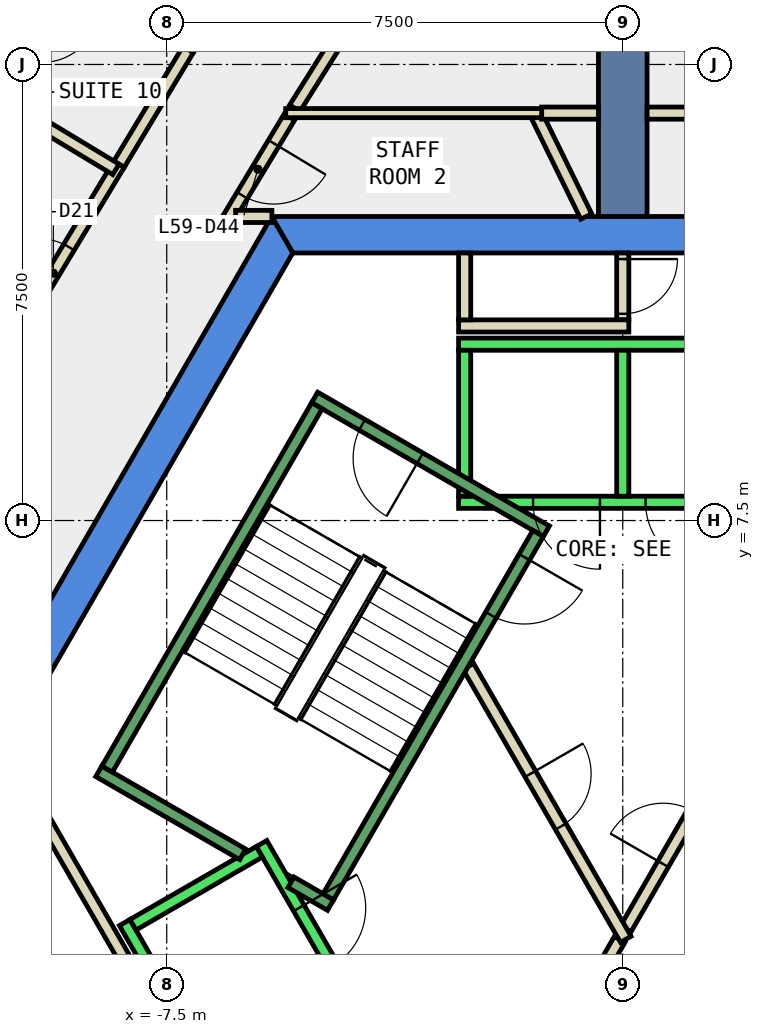
"""IFC4 building model, lengths in metres.
Left out: names, types, materials, properties, quantities, classifications, styles, units other than length and angle.
Written with IfcOpenShell. Run it as: python <this file> out.ifc"""

import sys

from ifc_helpers import new_model, si_unit, direction, frame, frame_2d, origin, place, context, subcontext, project, spatial, polyline, rectangle, outline, extrude, element, fill, save


model = new_model("IFC4")
c1 = context("Model", 3, precision=1e-05, world=origin(), true_north=direction((0.0, 1.0)))
c2 = subcontext(c1, "Body", "Model", "MODEL_VIEW")
j1 = project(units=[si_unit("LENGTHUNIT", "METRE"), si_unit("PLANEANGLEUNIT", "RADIAN")], contexts=[c1])
p1 = place(None, origin())
s1 = spatial("IfcSite", under=j1, at=p1, CompositionType="ELEMENT")
p2 = place(p1, origin())
s2 = spatial("IfcBuilding", under=s1, at=p2, CompositionType="ELEMENT")
p3 = place(p2, frame((0.0, 0.0, 259.4)))
s3 = spatial("IfcBuildingStorey", under=s2, at=p3, CompositionType="ELEMENT", Elevation=259.4)
p4 = place(p3, frame((0.0, 0.0, -0.34)))
e1 = element("IfcWall", 1, at=p4, inside=s3, PredefinedType="SHEAR", context=c2, shape_type="SweptSolid", body=[
    extrude(outline(polyline([(5.774, 12.5), (-5.774, 12.5), (-5.427, 11.9), (5.427, 11.9), (5.774, 12.5)])), origin(), (0.0, 0.0, 1.0), 3.6),
])
p5 = place(p3, frame((0.0, 0.0, -0.34)))
e2 = element("IfcWall", 2, at=p5, inside=s3, PredefinedType="SHEAR", context=c2, shape_type="SweptSolid", body=[
    extrude(outline(polyline([(-10.535, 4.253), (-10.015, 3.953), (-5.427, 11.9), (-5.774, 12.5), (-10.535, 4.253)])), origin(), (0.0, 0.0, 1.0), 3.6),
])
p6 = place(p3, frame((0.0, 0.0, -0.34)))
e3 = element("IfcWall", 3, at=p6, inside=s3, PredefinedType="SHEAR", context=c2, shape_type="SweptSolid", body=[
    extrude(outline(polyline([(-11.547, 2.5), (-5.774, -7.5), (-5.427, -6.9), (-10.854, 2.5), (-11.547, 2.5)])), origin(), (0.0, 0.0, 1.0), 3.6),
])
p7 = place(p3, frame((0.0, 12.5, -0.34), z_axis=(0.0, 0.0, 1.0), x_axis=(0.0, 1.0, 0.0)))
e4 = element("IfcWall", 4, at=p7, inside=s3, PredefinedType="SHEAR", context=c2, shape_type="SweptSolid", body=[
    extrude(rectangle(XDim=9.0, YDim=0.8, at=frame_2d((4.5, 0.0))), origin(), (0.0, 0.0, 1.0), 3.6),
])
p8 = place(p3, frame((-0.6, 12.5, 0.0), z_axis=(0.0, 0.0, 1.0), x_axis=(-0.440531456598, 0.897737175206, 0.0)))
e5 = element("IfcWall", 5, at=p8, inside=s3, PredefinedType="PARTITIONING", context=c2, shape_type="SweptSolid", body=[
    extrude(rectangle(XDim=1.918, YDim=0.2, at=frame_2d((0.959, 0.0))), origin(), (0.0, 0.0, 1.0), 3.26),
])
p9 = place(p3, frame((-5.482, 14.136, 0.0), z_axis=(0.0, 0.0, 1.0), x_axis=(-0.516156559549, -0.856494253357, 0.0)))
e6 = element("IfcWall", 6, at=p9, inside=s3, PredefinedType="PARTITIONING", context=c2, shape_type="SweptSolid", body=[
    extrude(rectangle(XDim=2.009, YDim=0.2, at=frame_2d((1.005, 0.0))), origin(), (0.0, 0.0, 1.0), 3.26),
])
p10 = place(p9, frame((0.504, 0.0, 0.0)))
e7 = element("IfcOpeningElement", 7, at=p10, cuts=e6, PredefinedType="OPENING", context=c2, shape_type="SweptSolid", body=[
    extrude(rectangle(XDim=1.0, YDim=2.1, at=frame_2d((0.5, 1.05))), frame((0.0, 0.11, 0.0), z_axis=(0.0, -1.0, 0.0), x_axis=(1.0, 0.0, 0.0)), (0.0, 0.0, 1.0), 0.22),
])
p11 = place(p3, frame((-6.367, 12.501, 0.0), z_axis=(0.0, 0.0, 1.0), x_axis=(1.0, 0.0, 0.0)))
e8 = element("IfcWall", 8, at=p11, inside=s3, PredefinedType="PARTITIONING", context=c2, shape_type="SweptSolid", body=[
    extrude(rectangle(XDim=0.596, YDim=0.2, at=frame_2d((0.298, 0.0))), origin(), (0.0, 0.0, 1.0), 3.26),
])
p12 = place(p3, frame((0.4, 14.2, 0.0), z_axis=(0.0, 0.0, 1.0), x_axis=(1.0, 0.0, 0.0)))
e9 = element("IfcWall", 9, at=p12, inside=s3, PredefinedType="PARTITIONING", context=c2, shape_type="SweptSolid", body=[
    extrude(rectangle(XDim=5.143, YDim=0.2, at=frame_2d((2.572, 0.0))), origin(), (0.0, 0.0, 1.0), 3.26),
])
p13 = place(p3, frame((-1.334, 14.2, 0.0), z_axis=(0.0, 0.0, 1.0), x_axis=(1.0, 0.0, 0.0)))
e10 = element("IfcWall", 10, at=p13, inside=s3, PredefinedType="PARTITIONING", context=c2, shape_type="SweptSolid", body=[
    extrude(rectangle(XDim=0.934, YDim=0.2, at=frame_2d((0.467, 0.0))), origin(), (0.0, 0.0, 1.0), 3.26),
])
p14 = place(p3, frame((-2.311, 19.181, 0.0), z_axis=(0.0, 0.0, 1.0), x_axis=(-0.532551510955, -0.846397594621, 0.0)))
e11 = element("IfcWall", 11, at=p14, inside=s3, PredefinedType="PARTITIONING", context=c2, shape_type="SweptSolid", body=[
    extrude(rectangle(XDim=5.789, YDim=0.2, at=frame_2d((2.895, 0.0))), origin(), (0.0, 0.0, 1.0), 3.26),
])
p15 = place(p14, frame((2.394, 0.0, 0.0)))
e12 = element("IfcOpeningElement", 12, at=p15, cuts=e11, PredefinedType="OPENING", context=c2, shape_type="SweptSolid", body=[
    extrude(rectangle(XDim=1.0, YDim=2.1, at=frame_2d((0.5, 1.05))), frame((0.0, 0.11, 0.0), z_axis=(0.0, -1.0, 0.0), x_axis=(1.0, 0.0, 0.0)), (0.0, 0.0, 1.0), 0.22),
])
p16 = place(p3, frame((-7.15, 15.246, 0.0), z_axis=(0.0, 0.0, 1.0), x_axis=(0.532449518014, 0.846461759778, 0.0)))
e13 = element("IfcWall", 13, at=p16, inside=s3, PredefinedType="PARTITIONING", context=c2, shape_type="SweptSolid", body=[
    extrude(rectangle(XDim=3.525, YDim=0.2, at=frame_2d((1.763, 0.0))), origin(), (0.0, 0.0, 1.0), 3.26),
])
p17 = place(p16, frame((1.313, 0.0, 0.0)))
e14 = element("IfcOpeningElement", 14, at=p17, cuts=e13, PredefinedType="OPENING", context=c2, shape_type="SweptSolid", body=[
    extrude(rectangle(XDim=1.0, YDim=2.1, at=frame_2d((0.5, 1.05))), frame((0.0, 0.11, 0.0), z_axis=(0.0, -1.0, 0.0), x_axis=(1.0, 0.0, 0.0)), (0.0, 0.0, 1.0), 0.22),
])
p18 = place(p3, frame((-10.498, 9.689, 0.0), z_axis=(0.0, 0.0, 1.0), x_axis=(0.516353342298, 0.856375633643, 0.0)))
e15 = element("IfcWall", 15, at=p18, inside=s3, PredefinedType="PARTITIONING", context=c2, shape_type="SweptSolid", body=[
    extrude(rectangle(XDim=4.288, YDim=0.2, at=frame_2d((2.144, 0.0))), origin(), (0.0, 0.0, 1.0), 3.26),
])
p19 = place(p18, frame((1.694, 0.0, 0.0)))
e16 = element("IfcOpeningElement", 16, at=p19, cuts=e15, PredefinedType="OPENING", context=c2, shape_type="SweptSolid", body=[
    extrude(rectangle(XDim=1.0, YDim=2.1, at=frame_2d((0.5, 1.05))), frame((0.0, 0.11, 0.0), z_axis=(0.0, -1.0, 0.0), x_axis=(1.0, 0.0, 0.0)), (0.0, 0.0, 1.0), 0.22),
])
p20 = place(p3, frame((-8.284, 13.361, 0.0), z_axis=(0.0, 0.0, 1.0), x_axis=(0.516354965559, 0.856374654893, 0.0)))
e17 = element("IfcWall", 17, at=p20, inside=s3, PredefinedType="PARTITIONING", context=c2, shape_type="SweptSolid", body=[
    extrude(rectangle(XDim=2.2, YDim=0.2, at=frame_2d((1.1, 0.0))), origin(), (0.0, 0.0, 1.0), 3.26),
])
p21 = place(p3, frame((0.0, 11.9, 0.0), z_axis=(0.0, 0.0, 1.0), x_axis=(0.0, -1.0, 0.0)))
e18 = element("IfcWall", 18, at=p21, inside=s3, PredefinedType="PARTITIONING", context=c2, shape_type="SweptSolid", body=[
    extrude(rectangle(XDim=1.1, YDim=0.2, at=frame_2d((0.55, 0.0))), origin(), (0.0, 0.0, 1.0), 3.26),
])
p22 = place(p21, frame((0.1, 0.0, 0.0)))
e19 = element("IfcOpeningElement", 19, at=p22, cuts=e18, PredefinedType="OPENING", context=c2, shape_type="SweptSolid", body=[
    extrude(rectangle(XDim=0.9, YDim=2.1, at=frame_2d((0.45, 1.05))), frame((0.0, 0.11, 0.0), z_axis=(0.0, -1.0, 0.0), x_axis=(1.0, 0.0, 0.0)), (0.0, 0.0, 1.0), 0.22),
])
p23 = place(p3, frame((0.1, 10.7, 0.0), z_axis=(0.0, 0.0, 1.0), x_axis=(-1.0, 0.0, 0.0)))
e20 = element("IfcWall", 20, at=p23, inside=s3, PredefinedType="PARTITIONING", context=c2, shape_type="SweptSolid", body=[
    extrude(rectangle(XDim=2.8, YDim=0.2, at=frame_2d((1.4, 0.0))), origin(), (0.0, 0.0, 1.0), 3.26),
])
p24 = place(p3, frame((-2.6, 10.8, 0.0), z_axis=(0.0, 0.0, 1.0), x_axis=(0.0, 1.0, 0.0)))
e21 = element("IfcWall", 21, at=p24, inside=s3, PredefinedType="PARTITIONING", context=c2, shape_type="SweptSolid", body=[
    extrude(rectangle(XDim=1.1, YDim=0.2, at=frame_2d((0.55, 0.0))), origin(), (0.0, 0.0, 1.0), 3.26),
])
p25 = place(p3, frame((-9.751, 2.99, 0.0), z_axis=(0.0, 0.0, 1.0), x_axis=(0.499955951776, -0.866050833545, 0.0)))
e22 = element("IfcWall", 22, at=p25, inside=s3, PredefinedType="PARTITIONING", context=c2, shape_type="SweptSolid", body=[
    extrude(rectangle(XDim=5.4, YDim=0.2, at=frame_2d((2.7, 0.0))), origin(), (0.0, 0.0, 1.0), 3.26),
])
p26 = place(p3, frame((-1.334, 14.2, 0.0), z_axis=(0.0, 0.0, 1.0), x_axis=(-1.0, 0.0, 0.0)))
e23 = element("IfcWall", 23, at=p26, inside=s3, PredefinedType="PARTITIONING", context=c2, shape_type="SweptSolid", body=[
    extrude(rectangle(XDim=4.209, YDim=0.15, at=frame_2d((2.104, 0.0))), origin(), (0.0, 0.0, 1.0), 3.26),
])
p27 = place(p3, frame((-0.982, -1.0, 0.0), z_axis=(0.0, 0.0, 1.0), x_axis=(0.50024047865, 0.865886518847, 0.0)))
e24 = element("IfcWall", 24, at=p27, inside=s3, PredefinedType="PARTITIONING", context=c2, shape_type="SweptSolid", body=[
    extrude(rectangle(XDim=1.863, YDim=0.2, at=frame_2d((0.931, 0.0))), origin(), (0.0, 0.0, 1.0), 3.26),
])
p28 = place(p3, frame((0.05, 0.787, 0.0), z_axis=(0.0, 0.0, 1.0), x_axis=(0.499954076797, 0.866051915934, 0.0)))
e25 = element("IfcWall", 25, at=p28, inside=s3, PredefinedType="PARTITIONING", context=c2, shape_type="SweptSolid", body=[
    extrude(rectangle(XDim=3.558, YDim=0.2, at=frame_2d((1.779, 0.0))), origin(), (0.0, 0.0, 1.0), 3.26),
])
p29 = place(p28, frame((1.229, 0.0, 0.0)))
e26 = element("IfcOpeningElement", 26, at=p29, cuts=e25, PredefinedType="OPENING", context=c2, shape_type="SweptSolid", body=[
    extrude(rectangle(XDim=1.0, YDim=2.1, at=frame_2d((0.5, 1.05))), frame((0.0, 0.11, 0.0), z_axis=(0.0, -1.0, 0.0), x_axis=(1.0, 0.0, 0.0)), (0.0, 0.0, 1.0), 0.22),
])
p30 = place(p3, frame((-2.54, 5.1, 0.0), z_axis=(0.0, 0.0, 1.0), x_axis=(0.499925051871, -0.866068670783, 0.0)))
e27 = element("IfcWall", 27, at=p30, inside=s3, PredefinedType="PARTITIONING", context=c2, shape_type="SweptSolid", body=[
    extrude(rectangle(XDim=5.181, YDim=0.2, at=frame_2d((2.59, 0.0))), origin(), (0.0, 0.0, 1.0), 3.26),
])
p31 = place(p30, frame((2.04, 0.0, 0.0)))
e28 = element("IfcOpeningElement", 28, at=p31, cuts=e27, PredefinedType="OPENING", context=c2, shape_type="SweptSolid", body=[
    extrude(rectangle(XDim=1.0, YDim=2.1, at=frame_2d((0.5, 1.05))), frame((0.0, 0.11, 0.0), z_axis=(0.0, -1.0, 0.0), x_axis=(1.0, 0.0, 0.0)), (0.0, 0.0, 1.0), 0.22),
])
p32 = place(p3, frame((-9.088, 16.674, 0.0), z_axis=(0.0, 0.0, 1.0), x_axis=(-0.516780274192, -0.856118069081, 0.0)))
e29 = element("IfcWall", 29, at=p32, inside=s3, PredefinedType="PARTITIONING", context=c2, shape_type="SweptSolid", body=[
    extrude(rectangle(XDim=2.623, YDim=0.2, at=frame_2d((1.311, 0.0))), origin(), (0.0, 0.0, 1.0), 3.26),
])
p33 = place(p32, frame((0.861, 0.0, 0.0)))
e30 = element("IfcOpeningElement", 30, at=p33, cuts=e29, PredefinedType="OPENING", context=c2, shape_type="SweptSolid", body=[
    extrude(rectangle(XDim=0.9, YDim=2.1, at=frame_2d((0.45, 1.05))), frame((0.0, 0.11, 0.0), z_axis=(0.0, -1.0, 0.0), x_axis=(1.0, 0.0, 0.0)), (0.0, 0.0, 1.0), 0.22),
])
p34 = place(p3, frame((-10.306, 14.463, 0.0), z_axis=(0.0, 0.0, 1.0), x_axis=(0.856338986581, -0.51641411683, 0.0)))
e31 = element("IfcWall", 31, at=p34, inside=s3, PredefinedType="PARTITIONING", context=c2, shape_type="SweptSolid", body=[
    extrude(rectangle(XDim=2.301, YDim=0.2, at=frame_2d((1.15, 0.0))), origin(), (0.0, 0.0, 1.0), 3.26),
])
p35 = place(p3, frame((-9.25, -4.879, 0.0), z_axis=(0.0, 0.0, 1.0), x_axis=(-0.499944124422, 0.866057661161, 0.0)))
e32 = element("IfcWall", 32, at=p35, inside=s3, PredefinedType="PARTITIONING", context=c2, shape_type="SweptSolid", body=[
    extrude(rectangle(XDim=7.405, YDim=0.2, at=frame_2d((3.702, 0.0))), origin(), (0.0, 0.0, 1.0), 3.26),
])
p36 = place(p35, frame((2.533, 0.0, 0.0)))
e33 = element("IfcOpeningElement", 33, at=p36, cuts=e32, PredefinedType="OPENING", context=c2, shape_type="SweptSolid", body=[
    extrude(rectangle(XDim=0.9, YDim=2.1, at=frame_2d((0.45, 1.05))), frame((0.0, 0.11, 0.0), z_axis=(0.0, -1.0, 0.0), x_axis=(1.0, 0.0, 0.0)), (0.0, 0.0, 1.0), 0.22),
])
p37 = place(p3, frame((2.7, 7.8, 0.0), z_axis=(0.0, 0.0, 1.0), x_axis=(-1.0, 0.0, 0.0)))
e34 = element("IfcWall", 34, at=p37, inside=s3, PredefinedType="STANDARD", context=c2, shape_type="SweptSolid", body=[
    extrude(rectangle(XDim=5.4, YDim=0.2, at=frame_2d((2.7, 0.0))), origin(), (0.0, 0.0, 1.0), 3.26),
])
p38 = place(p37, frame((1.225, 0.0, 0.0)))
e35 = element("IfcOpeningElement", 35, at=p38, cuts=e34, PredefinedType="OPENING", context=c2, shape_type="SweptSolid", body=[
    extrude(rectangle(XDim=1.1, YDim=2.1, at=frame_2d((0.55, 1.05))), frame((0.0, 0.11, 0.0), z_axis=(0.0, -1.0, 0.0), x_axis=(1.0, 0.0, 0.0)), (0.0, 0.0, 1.0), 0.22),
])
p39 = place(p37, frame((3.075, 0.0, 0.0)))
e36 = element("IfcOpeningElement", 36, at=p39, cuts=e34, PredefinedType="OPENING", context=c2, shape_type="SweptSolid", body=[
    extrude(rectangle(XDim=1.1, YDim=2.1, at=frame_2d((0.55, 1.05))), frame((0.0, 0.11, 0.0), z_axis=(0.0, -1.0, 0.0), x_axis=(1.0, 0.0, 0.0)), (0.0, 0.0, 1.0), 0.22),
])
p40 = place(p3, frame((2.7, 10.4, 0.0), z_axis=(0.0, 0.0, 1.0), x_axis=(-1.0, 0.0, 0.0)))
e37 = element("IfcWall", 37, at=p40, inside=s3, PredefinedType="STANDARD", context=c2, shape_type="SweptSolid", body=[
    extrude(rectangle(XDim=5.4, YDim=0.2, at=frame_2d((2.7, 0.0))), origin(), (0.0, 0.0, 1.0), 3.26),
])
for number, where, z_axis, x_axis in (
    (38, (0.0, 7.9, 0.0), (0.0, 0.0, 1.0), (0.0, 1.0, 0.0)),
    (39, (-2.6, 7.9, 0.0), (0.0, 0.0, 1.0), (0.0, 1.0, 0.0)),
):
    element("IfcWall", number, at=place(p3, frame(where, z_axis=z_axis, x_axis=x_axis)), inside=s3, PredefinedType="STANDARD", context=c2, shape_type="SweptSolid", body=[
        extrude(rectangle(XDim=2.4, YDim=0.2, at=frame_2d((1.2, 0.0))), origin(), (0.0, 0.0, 1.0), 3.26),
    ])
p41 = place(p3, frame((-5.94, 2.188, 0.0), z_axis=(0.0, 0.0, 1.0), x_axis=(0.500034260056, -0.866005622828, 0.0)))
e40 = element("IfcWall", 40, at=p41, inside=s3, PredefinedType="STANDARD", context=c2, shape_type="SweptSolid", body=[
    extrude(rectangle(XDim=5.399, YDim=0.2, at=frame_2d((2.7, 0.0))), origin(), (0.0, 0.0, 1.0), 3.26),
])
p42 = place(p41, frame((3.075, 0.0, 0.0)))
e41 = element("IfcOpeningElement", 41, at=p42, cuts=e40, PredefinedType="OPENING", context=c2, shape_type="SweptSolid", body=[
    extrude(rectangle(XDim=1.1, YDim=2.1, at=frame_2d((0.55, 1.05))), frame((0.0, 0.11, 0.0), z_axis=(0.0, -1.0, 0.0), x_axis=(1.0, 0.0, 0.0)), (0.0, 0.0, 1.0), 0.22),
])
p43 = place(p41, frame((1.225, 0.0, 0.0)))
e42 = element("IfcOpeningElement", 42, at=p43, cuts=e40, PredefinedType="OPENING", context=c2, shape_type="SweptSolid", body=[
    extrude(rectangle(XDim=1.1, YDim=2.1, at=frame_2d((0.55, 1.05))), frame((0.0, 0.11, 0.0), z_axis=(0.0, -1.0, 0.0), x_axis=(1.0, 0.0, 0.0)), (0.0, 0.0, 1.0), 0.22),
])
p44 = place(p3, frame((-8.192, 0.888, 0.0), z_axis=(0.0, 0.0, 1.0), x_axis=(0.500034260056, -0.866005622828, 0.0)))
e43 = element("IfcWall", 43, at=p44, inside=s3, PredefinedType="STANDARD", context=c2, shape_type="SweptSolid", body=[
    extrude(rectangle(XDim=5.399, YDim=0.2, at=frame_2d((2.7, 0.0))), origin(), (0.0, 0.0, 1.0), 3.26),
])
p45 = place(p3, frame((-5.977, 2.052, 0.0), z_axis=(0.0, 0.0, 1.0), x_axis=(-0.865973769406, -0.500089422704, 0.0)))
e44 = element("IfcWall", 44, at=p45, inside=s3, PredefinedType="STANDARD", context=c2, shape_type="SweptSolid", body=[
    extrude(rectangle(XDim=2.399, YDim=0.2, at=frame_2d((1.2, 0.0))), origin(), (0.0, 0.0, 1.0), 3.26),
])
p46 = place(p3, frame((-1.256, 7.324, 0.0), z_axis=(0.0, 0.0, 1.0), x_axis=(-0.866046073146, 0.499964197906, 0.0)))
e45 = element("IfcWall", 45, at=p46, inside=s3, PredefinedType="STANDARD", context=c2, shape_type="SweptSolid", body=[
    extrude(rectangle(XDim=4.4, YDim=0.2, at=frame_2d((2.2, 0.0))), origin(), (0.0, 0.0, 1.0), 3.26),
])
p47 = place(p46, frame((2.4, 0.0, 0.0)))
e46 = element("IfcOpeningElement", 46, at=p47, cuts=e45, PredefinedType="OPENING", context=c2, shape_type="SweptSolid", body=[
    extrude(rectangle(XDim=1.1, YDim=2.2, at=frame_2d((0.55, 1.1))), frame((0.0, 0.11, 0.0), z_axis=(0.0, -1.0, 0.0), x_axis=(1.0, 0.0, 0.0)), (0.0, 0.0, 1.0), 0.22),
])
p48 = place(p3, frame((-6.25, 2.01, 0.0), z_axis=(0.0, 0.0, 1.0), x_axis=(-0.86611865017, 0.499838457731, 0.0)))
e47 = element("IfcWall", 47, at=p48, inside=s3, PredefinedType="STANDARD", context=c2, shape_type="SweptSolid", body=[
    extrude(rectangle(XDim=2.733, YDim=0.2, at=frame_2d((1.366, 0.0))), origin(), (0.0, 0.0, 1.0), 3.26),
])
p49 = place(p3, frame((-4.806, 1.176, 0.0), z_axis=(0.0, 0.0, 1.0), x_axis=(-0.866558586415, 0.499075361355, 0.0)))
e48 = element("IfcWall", 48, at=p49, inside=s3, PredefinedType="STANDARD", context=c2, shape_type="SweptSolid", body=[
    extrude(rectangle(XDim=0.751, YDim=0.2, at=frame_2d((0.376, 0.0))), origin(), (0.0, 0.0, 1.0), 3.26),
])
p50 = place(p3, frame((-1.393, 7.288, 0.0), z_axis=(0.0, 0.0, 1.0), x_axis=(-0.499963383562, -0.866046543262, 0.0)))
e49 = element("IfcWall", 49, at=p50, inside=s3, PredefinedType="STANDARD", context=c2, shape_type="SweptSolid", body=[
    extrude(rectangle(XDim=6.9, YDim=0.2, at=frame_2d((3.45, 0.0))), origin(), (0.0, 0.0, 1.0), 3.26),
])
p51 = place(p50, frame((0.45, 0.0, 0.0)))
e50 = element("IfcOpeningElement", 50, at=p51, cuts=e49, PredefinedType="OPENING", context=c2, shape_type="SweptSolid", body=[
    extrude(rectangle(XDim=1.1, YDim=2.2, at=frame_2d((0.55, 1.1))), frame((0.0, 0.11, 0.0), z_axis=(0.0, -1.0, 0.0), x_axis=(1.0, 0.0, 0.0)), (0.0, 0.0, 1.0), 0.22),
])
p52 = place(p3, frame((-5.03, 9.388, 0.0), z_axis=(0.0, 0.0, 1.0), x_axis=(-0.499978703459, -0.866037698999, 0.0)))
e51 = element("IfcWall", 51, at=p52, inside=s3, PredefinedType="STANDARD", context=c2, shape_type="SweptSolid", body=[
    extrude(rectangle(XDim=6.9, YDim=0.2, at=frame_2d((3.45, 0.0))), origin(), (0.0, 0.0, 1.0), 3.26),
])
p53 = place(p19, origin())
e52 = element("IfcDoor", 52, at=p53, inside=s3, OperationType="SINGLE_SWING_RIGHT", PredefinedType="DOOR", context=c2, shape_type="SweptSolid", body=[
    extrude(rectangle(XDim=1.0, YDim=2.1, at=frame_2d((0.5, 1.05))), frame((0.0, 0.025, 0.0), z_axis=(0.0, -1.0, 0.0), x_axis=(1.0, 0.0, 0.0)), (0.0, 0.0, 1.0), 0.05),
])
fill(e16, e52)
p54 = place(p10, origin())
e53 = element("IfcDoor", 53, at=p54, inside=s3, OperationType="SINGLE_SWING_LEFT", PredefinedType="DOOR", context=c2, shape_type="SweptSolid", body=[
    extrude(rectangle(XDim=1.0, YDim=2.1, at=frame_2d((0.5, 1.05))), frame((0.0, 0.025, 0.0), z_axis=(0.0, -1.0, 0.0), x_axis=(1.0, 0.0, 0.0)), (0.0, 0.0, 1.0), 0.05),
])
fill(e7, e53)
p55 = place(p29, origin())
e54 = element("IfcDoor", 54, at=p55, inside=s3, OperationType="SINGLE_SWING_RIGHT", PredefinedType="DOOR", context=c2, shape_type="SweptSolid", body=[
    extrude(rectangle(XDim=1.0, YDim=2.1, at=frame_2d((0.5, 1.05))), frame((0.0, 0.025, 0.0), z_axis=(0.0, -1.0, 0.0), x_axis=(1.0, 0.0, 0.0)), (0.0, 0.0, 1.0), 0.05),
])
fill(e26, e54)
p56 = place(p31, origin())
e55 = element("IfcDoor", 55, at=p56, inside=s3, OperationType="SINGLE_SWING_RIGHT", PredefinedType="DOOR", context=c2, shape_type="SweptSolid", body=[
    extrude(rectangle(XDim=1.0, YDim=2.1, at=frame_2d((0.5, 1.05))), frame((0.0, 0.025, 0.0), z_axis=(0.0, -1.0, 0.0), x_axis=(1.0, 0.0, 0.0)), (0.0, 0.0, 1.0), 0.05),
])
fill(e28, e55)
p57 = place(p22, origin())
e56 = element("IfcDoor", 56, at=p57, inside=s3, OperationType="SINGLE_SWING_LEFT", PredefinedType="DOOR", context=c2, shape_type="SweptSolid", body=[
    extrude(rectangle(XDim=0.9, YDim=2.1, at=frame_2d((0.45, 1.05))), frame((0.0, 0.025, 0.0), z_axis=(0.0, -1.0, 0.0), x_axis=(1.0, 0.0, 0.0)), (0.0, 0.0, 1.0), 0.05),
])
fill(e19, e56)
p58 = place(p38, origin())
e57 = element("IfcDoor", 57, at=p58, inside=s3, OperationType="SLIDING_TO_LEFT", PredefinedType="DOOR", context=c2, shape_type="SweptSolid", body=[
    extrude(rectangle(XDim=1.1, YDim=2.1, at=frame_2d((0.55, 1.05))), frame((0.0, 0.025, 0.0), z_axis=(0.0, -1.0, 0.0), x_axis=(1.0, 0.0, 0.0)), (0.0, 0.0, 1.0), 0.05),
])
fill(e35, e57)
p59 = place(p39, origin())
e58 = element("IfcDoor", 58, at=p59, inside=s3, OperationType="SLIDING_TO_LEFT", PredefinedType="DOOR", context=c2, shape_type="SweptSolid", body=[
    extrude(rectangle(XDim=1.1, YDim=2.1, at=frame_2d((0.55, 1.05))), frame((0.0, 0.025, 0.0), z_axis=(0.0, -1.0, 0.0), x_axis=(1.0, 0.0, 0.0)), (0.0, 0.0, 1.0), 0.05),
])
fill(e36, e58)
p60 = place(p43, origin())
e59 = element("IfcDoor", 59, at=p60, inside=s3, OperationType="SLIDING_TO_LEFT", PredefinedType="DOOR", context=c2, shape_type="SweptSolid", body=[
    extrude(rectangle(XDim=1.1, YDim=2.1, at=frame_2d((0.55, 1.05))), frame((0.0, 0.025, 0.0), z_axis=(0.0, -1.0, 0.0), x_axis=(1.0, 0.0, 0.0)), (0.0, 0.0, 1.0), 0.05),
])
fill(e42, e59)
p61 = place(p51, origin())
e60 = element("IfcDoor", 60, at=p61, inside=s3, OperationType="SINGLE_SWING_LEFT", PredefinedType="DOOR", context=c2, shape_type="SweptSolid", body=[
    extrude(rectangle(XDim=1.1, YDim=2.2, at=frame_2d((0.55, 1.1))), frame((0.0, 0.025, 0.0), z_axis=(0.0, -1.0, 0.0), x_axis=(1.0, 0.0, 0.0)), (0.0, 0.0, 1.0), 0.05),
])
fill(e50, e60)
p62 = place(p47, origin())
e61 = element("IfcDoor", 61, at=p62, inside=s3, OperationType="SINGLE_SWING_LEFT", PredefinedType="DOOR", context=c2, shape_type="SweptSolid", body=[
    extrude(rectangle(XDim=1.1, YDim=2.2, at=frame_2d((0.55, 1.1))), frame((0.0, 0.025, 0.0), z_axis=(0.0, -1.0, 0.0), x_axis=(1.0, 0.0, 0.0)), (0.0, 0.0, 1.0), 0.05),
])
fill(e46, e61)
save(model, sys.argv[1])
